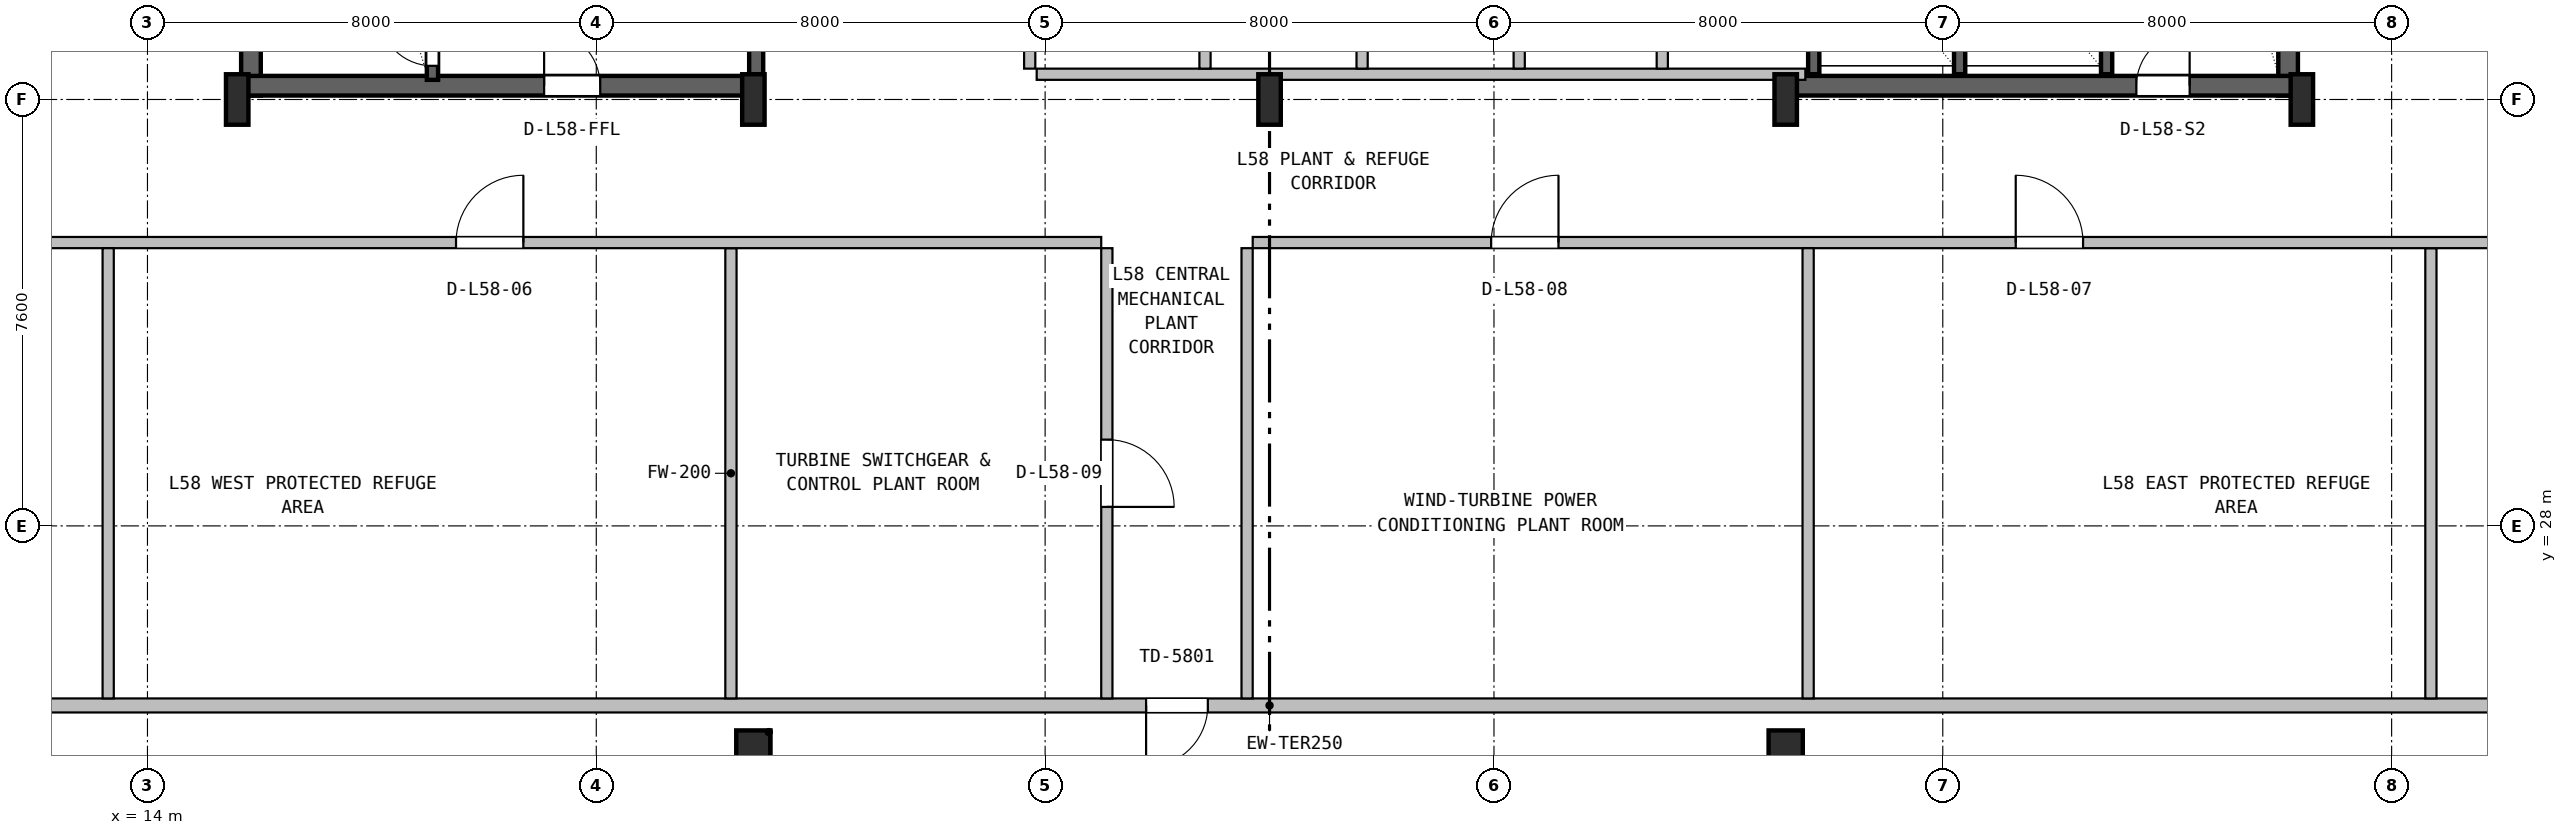
"""IFC4 building model, lengths in metres.
Left out: names, types, materials, properties, quantities, classifications, styles, units other than length and angle.
Written with IfcOpenShell. Run it as: python <this file> out.ifc"""

import sys

from ifc_helpers import new_model, si_unit, direction, frame, frame_2d, origin, origin_2d, place, context, subcontext, project, spatial, rectangle, hollow_circle, i_section, extrude, source, transform, mapped, element, fill, save


model = new_model("IFC4")
c1 = context("Model", 3, precision=1e-05, world=origin(), true_north=direction((0.0, 1.0)))
c2 = subcontext(c1, "Body", "Model", "MODEL_VIEW")
j1 = project(units=[si_unit("LENGTHUNIT", "METRE"), si_unit("PLANEANGLEUNIT", "RADIAN")], contexts=[c1])
p1 = place(None, origin())
s1 = spatial("IfcSite", under=j1, at=p1, CompositionType="ELEMENT")
p2 = place(p1, origin())
s2 = spatial("IfcBuilding", under=s1, at=p2, CompositionType="ELEMENT")
p3 = place(p2, frame((0.0, 0.0, 234.0)))
s3 = spatial("IfcBuildingStorey", under=s2, at=p3, CompositionType="ELEMENT", Elevation=234.0)
for number, where, z_axis, x_axis in (
    (1, (15.845, 35.67, 0.0), (0.0, 0.0, 1.0), (0.0, 1.0, 0.0)),
    (2, (52.155, 35.67, 0.0), (0.0, 0.0, 1.0), (0.0, 1.0, 0.0)),
):
    element("IfcWall", number, at=place(p3, frame(where, z_axis=z_axis, x_axis=x_axis)), inside=s3, PredefinedType="SHEAR", context=c2, shape_type="SweptSolid", body=[
        extrude(rectangle(XDim=11.13, YDim=0.35, at=frame_2d((5.565, 0.0))), origin(), (0.0, 0.0, 1.0), 5.15),
    ])
p4 = place(p3, frame((15.67, 35.845, 0.0), z_axis=(0.0, 0.0, 1.0), x_axis=(1.0, 0.0, 0.0)))
e3 = element("IfcWall", 3, at=p4, inside=s3, PredefinedType="SHEAR", context=c2, shape_type="SweptSolid", body=[
    extrude(rectangle(XDim=9.13, YDim=0.35, at=frame_2d((4.565, 0.0))), origin(), (0.0, 0.0, 1.0), 5.15),
])
p5 = place(p4, frame((5.4, 0.0, 0.0)))
e4 = element("IfcOpeningElement", 4, at=p5, cuts=e3, PredefinedType="OPENING", context=c2, shape_type="SweptSolid", body=[
    extrude(rectangle(XDim=1.0, YDim=2.1, at=frame_2d((0.5, 1.05))), frame((0.0, 0.185, 0.0), z_axis=(0.0, -1.0, 0.0), x_axis=(1.0, 0.0, 0.0)), (0.0, 0.0, 1.0), 0.37),
])
p6 = place(p3, frame((43.2, 35.845, 0.0), z_axis=(0.0, 0.0, 1.0), x_axis=(1.0, 0.0, 0.0)))
e5 = element("IfcWall", 5, at=p6, inside=s3, PredefinedType="SHEAR", context=c2, shape_type="SweptSolid", body=[
    extrude(rectangle(XDim=9.13, YDim=0.35, at=frame_2d((4.565, 0.0))), origin(), (0.0, 0.0, 1.0), 5.15),
])
p7 = place(p6, frame((6.25, 0.0, 0.0)))
e6 = element("IfcOpeningElement", 6, at=p7, cuts=e5, PredefinedType="OPENING", context=c2, shape_type="SweptSolid", body=[
    extrude(rectangle(XDim=0.95, YDim=2.1, at=frame_2d((0.475, 1.05))), frame((0.0, 0.185, 0.0), z_axis=(0.0, -1.0, 0.0), x_axis=(1.0, 0.0, 0.0)), (0.0, 0.0, 1.0), 0.37),
])
m1 = source(origin(), c2, "Body", "SweptSolid", [
    extrude(i_section(OverallWidth=0.4, OverallDepth=0.9, WebThickness=0.016, FlangeThickness=0.028, FilletRadius=0.016, at=origin_2d()), origin(), (0.0, 0.0, 1.0), 5.4),
])
for number, where, z_axis, x_axis in (
    (7, (15.6, 35.6, 0.0), (0.0, 0.0, 1.0), (1.0, 0.0, 0.0)),
    (8, (24.8, 35.6, 0.0), (0.0, 0.0, 1.0), (1.0, 0.0, 0.0)),
    (9, (34.0, 35.6, 0.0), (0.0, 0.0, 1.0), (1.0, 0.0, 0.0)),
    (10, (43.2, 35.6, 0.0), (0.0, 0.0, 1.0), (1.0, 0.0, 0.0)),
    (11, (52.4, 35.6, 0.0), (0.0, 0.0, 1.0), (1.0, 0.0, 0.0)),
):
    element("IfcColumn", number, at=place(p3, frame(where, z_axis=z_axis, x_axis=x_axis)), inside=s3, PredefinedType="COLUMN", context=c2, shape_type="MappedRepresentation", body=[
        mapped(m1, transform((0.0, 0.0, 0.0), x_axis=(1.0, 0.0, 0.0), y_axis=(0.0, 1.0, 0.0), z_axis=(0.0, 0.0, 1.0), scale=1.0)),
    ])
m2 = source(origin(), c2, "Body", "SweptSolid", [
    extrude(hollow_circle(Radius=0.305, WallThickness=0.025, at=origin_2d()), origin(), (0.0, 0.0, 1.0), 5.4),
])
for number, where, z_axis, x_axis in (
    (12, (24.8, 24.05, 0.0), (0.0, 0.0, 1.0), (1.0, 0.0, 0.0)),
    (13, (43.2, 24.05, 0.0), (0.0, 0.0, 1.0), (1.0, 0.0, 0.0)),
):
    element("IfcColumn", number, at=place(p3, frame(where, z_axis=z_axis, x_axis=x_axis)), inside=s3, PredefinedType="COLUMN", context=c2, shape_type="MappedRepresentation", body=[
        mapped(m2, transform((0.0, 0.0, 0.0), x_axis=(1.0, 0.0, 0.0), y_axis=(0.0, 1.0, 0.0), z_axis=(0.0, 0.0, 1.0), scale=1.0)),
    ])
p8 = place(p3, frame((9.58, 24.8, 0.0), z_axis=(0.0, 0.0, 1.0), x_axis=(1.0, 0.0, 0.0)))
e14 = element("IfcWall", 14, at=p8, inside=s3, PredefinedType="SOLIDWALL", context=c2, shape_type="SweptSolid", body=[
    extrude(rectangle(XDim=48.84, YDim=0.25, at=frame_2d((24.42, 0.0))), origin(), (0.0, 0.0, 1.0), 4.508),
])
p9 = place(p8, frame((22.22, 0.0, 0.0)))
e15 = element("IfcOpeningElement", 15, at=p9, cuts=e14, PredefinedType="OPENING", context=c2, shape_type="SweptSolid", body=[
    extrude(rectangle(XDim=1.1, YDim=2.15, at=frame_2d((0.55, 1.075))), frame((0.0, 0.135, 0.0), z_axis=(0.0, -1.0, 0.0), x_axis=(1.0, 0.0, 0.0)), (0.0, 0.0, 1.0), 0.27),
])
p10 = place(p3, frame((19.08, 35.95, 0.0), z_axis=(0.0, 0.0, 1.0), x_axis=(0.0, 1.0, 0.0)))
e16 = element("IfcWall", 16, at=p10, inside=s3, PredefinedType="SHEAR", context=c2, shape_type="SweptSolid", body=[
    extrude(rectangle(XDim=9.65, YDim=0.2, at=frame_2d((4.825, 0.0))), origin(), (0.0, 0.0, 1.0), 5.15),
])
p11 = place(p10, frame((0.25, 0.0, 0.0)))
e17 = element("IfcOpeningElement", 17, at=p11, cuts=e16, PredefinedType="OPENING", context=c2, shape_type="SweptSolid", body=[
    extrude(rectangle(XDim=0.95, YDim=2.1, at=frame_2d((0.475, 1.05))), frame((0.0, 0.11, 0.0), z_axis=(0.0, -1.0, 0.0), x_axis=(1.0, 0.0, 0.0)), (0.0, 0.0, 1.0), 0.22),
])
p12 = place(p3, frame((24.85, 36.05, 0.0), z_axis=(0.0, 0.0, 1.0), x_axis=(0.0, 1.0, 0.0)))
e18 = element("IfcWall", 18, at=p12, inside=s3, PredefinedType="SHEAR", context=c2, shape_type="SweptSolid", body=[
    extrude(rectangle(XDim=10.45, YDim=0.25, at=frame_2d((5.225, 0.0))), origin(), (0.0, 0.0, 1.0), 5.15),
])
p13 = place(p3, frame((48.92, 36.05, 0.0), z_axis=(0.0, 0.0, 1.0), x_axis=(0.0, 1.0, 0.0)))
e19 = element("IfcWall", 19, at=p13, inside=s3, PredefinedType="SHEAR", context=c2, shape_type="SweptSolid", body=[
    extrude(rectangle(XDim=10.5, YDim=0.2, at=frame_2d((5.25, 0.0))), origin(), (0.0, 0.0, 1.0), 5.15),
])
for number, where, z_axis, x_axis in (
    (20, (43.7, 36.05, 0.0), (0.0, 0.0, 1.0), (0.0, 1.0, 0.0)),
    (21, (46.3, 36.05, 0.0), (0.0, 0.0, 1.0), (0.0, 1.0, 0.0)),
):
    element("IfcWall", number, at=place(p3, frame(where, z_axis=z_axis, x_axis=x_axis)), inside=s3, PredefinedType="SHEAR", context=c2, shape_type="SweptSolid", body=[
        extrude(rectangle(XDim=3.05, YDim=0.2, at=frame_2d((1.525, 0.0))), origin(), (0.0, 0.0, 1.0), 5.15),
    ])
p14 = place(p3, frame((29.85, 36.05, 0.0), z_axis=(0.0, 0.0, 1.0), x_axis=(1.0, 0.0, 0.0)))
e22 = element("IfcWall", 22, at=p14, inside=s3, PredefinedType="SOLIDWALL", context=c2, shape_type="SweptSolid", body=[
    extrude(rectangle(XDim=13.7, YDim=0.2, at=frame_2d((6.85, 0.0))), origin(), (0.0, 0.0, 1.0), 5.13),
])
for number, where, z_axis, x_axis in (
    (23, (32.85, 36.15, 0.0), (0.0, 0.0, 1.0), (0.0, 1.0, 0.0)),
    (24, (29.725, 36.15, 0.0), (0.0, 0.0, 1.0), (0.0, 1.0, 0.0)),
    (25, (35.65, 36.15, 0.0), (0.0, 0.0, 1.0), (0.0, 1.0, 0.0)),
    (26, (38.45, 36.15, 0.0), (0.0, 0.0, 1.0), (0.0, 1.0, 0.0)),
    (27, (41.0, 36.15, 0.0), (0.0, 0.0, 1.0), (0.0, 1.0, 0.0)),
):
    element("IfcWall", number, at=place(p3, frame(where, z_axis=z_axis, x_axis=x_axis)), inside=s3, PredefinedType="SOLIDWALL", context=c2, shape_type="SweptSolid", body=[
        extrude(rectangle(XDim=3.0, YDim=0.2, at=frame_2d((1.5, 0.0))), origin(), (0.0, 0.0, 1.0), 5.13),
    ])
p15 = place(p3, frame((24.4, 24.925, 0.0), z_axis=(0.0, 0.0, 1.0), x_axis=(0.0, 1.0, 0.0)))
e28 = element("IfcWall", 28, at=p15, inside=s3, PredefinedType="SOLIDWALL", context=c2, shape_type="SweptSolid", body=[
    extrude(rectangle(XDim=8.025, YDim=0.2, at=frame_2d((4.012, 0.0))), origin(), (0.0, 0.0, 1.0), 4.822),
])
p16 = place(p3, frame((9.68, 33.05, 0.0), z_axis=(0.0, 0.0, 1.0), x_axis=(1.0, 0.0, 0.0)))
e29 = element("IfcWall", 29, at=p16, inside=s3, PredefinedType="SOLIDWALL", context=c2, shape_type="SweptSolid", body=[
    extrude(rectangle(XDim=21.32, YDim=0.2, at=frame_2d((10.66, 0.0))), origin(), (0.0, 0.0, 1.0), 4.508),
])
p17 = place(p16, frame((9.82, 0.0, 0.0)))
e30 = element("IfcOpeningElement", 30, at=p17, cuts=e29, PredefinedType="OPENING", context=c2, shape_type="SweptSolid", body=[
    extrude(rectangle(XDim=1.2, YDim=2.1, at=frame_2d((0.6, 1.05))), frame((0.0, 0.11, 0.0), z_axis=(0.0, -1.0, 0.0), x_axis=(1.0, 0.0, 0.0)), (0.0, 0.0, 1.0), 0.22),
])
for number, where, z_axis, x_axis in (
    (31, (13.3, 24.925, 0.0), (0.0, 0.0, 1.0), (0.0, 1.0, 0.0)),
    (32, (54.7, 24.925, 0.0), (0.0, 0.0, 1.0), (0.0, 1.0, 0.0)),
):
    element("IfcWall", number, at=place(p3, frame(where, z_axis=z_axis, x_axis=x_axis)), inside=s3, PredefinedType="SOLIDWALL", context=c2, shape_type="SweptSolid", body=[
        extrude(rectangle(XDim=8.025, YDim=0.2, at=frame_2d((4.012, 0.0))), origin(), (0.0, 0.0, 1.0), 4.822),
    ])
p18 = place(p3, frame((33.7, 33.05, 0.0), z_axis=(0.0, 0.0, 1.0), x_axis=(1.0, 0.0, 0.0)))
e33 = element("IfcWall", 33, at=p18, inside=s3, PredefinedType="SOLIDWALL", context=c2, shape_type="SweptSolid", body=[
    extrude(rectangle(XDim=24.62, YDim=0.2, at=frame_2d((12.31, 0.0))), origin(), (0.0, 0.0, 1.0), 4.508),
])
p19 = place(p18, frame((13.6, 0.0, 0.0)))
e34 = element("IfcOpeningElement", 34, at=p19, cuts=e33, PredefinedType="OPENING", context=c2, shape_type="SweptSolid", body=[
    extrude(rectangle(XDim=1.2, YDim=2.1, at=frame_2d((0.6, 1.05))), frame((0.0, 0.11, 0.0), z_axis=(0.0, -1.0, 0.0), x_axis=(1.0, 0.0, 0.0)), (0.0, 0.0, 1.0), 0.22),
])
p20 = place(p18, frame((4.25, 0.0, 0.0)))
e35 = element("IfcOpeningElement", 35, at=p20, cuts=e33, PredefinedType="OPENING", context=c2, shape_type="SweptSolid", body=[
    extrude(rectangle(XDim=1.2, YDim=2.1, at=frame_2d((0.6, 1.05))), frame((0.0, 0.11, 0.0), z_axis=(0.0, -1.0, 0.0), x_axis=(1.0, 0.0, 0.0)), (0.0, 0.0, 1.0), 0.22),
])
for number, where, z_axis, x_axis in (
    (36, (43.6, 24.925, 0.0), (0.0, 0.0, 1.0), (0.0, 1.0, 0.0)),
    (37, (33.6, 24.925, 0.0), (0.0, 0.0, 1.0), (0.0, 1.0, 0.0)),
):
    element("IfcWall", number, at=place(p3, frame(where, z_axis=z_axis, x_axis=x_axis)), inside=s3, PredefinedType="SOLIDWALL", context=c2, shape_type="SweptSolid", body=[
        extrude(rectangle(XDim=8.025, YDim=0.2, at=frame_2d((4.012, 0.0))), origin(), (0.0, 0.0, 1.0), 4.822),
    ])
p21 = place(p3, frame((31.1, 24.925, 0.0), z_axis=(0.0, 0.0, 1.0), x_axis=(0.0, 1.0, 0.0)))
e38 = element("IfcWall", 38, at=p21, inside=s3, PredefinedType="SOLIDWALL", context=c2, shape_type="SweptSolid", body=[
    extrude(rectangle(XDim=8.025, YDim=0.2, at=frame_2d((4.012, 0.0))), origin(), (0.0, 0.0, 1.0), 4.822),
])
p22 = place(p21, frame((3.413, 0.0, 0.0)))
e39 = element("IfcOpeningElement", 39, at=p22, cuts=e38, PredefinedType="OPENING", context=c2, shape_type="SweptSolid", body=[
    extrude(rectangle(XDim=1.2, YDim=2.1, at=frame_2d((0.6, 1.05))), frame((0.0, 0.11, 0.0), z_axis=(0.0, -1.0, 0.0), x_axis=(1.0, 0.0, 0.0)), (0.0, 0.0, 1.0), 0.22),
])
m3 = source(origin(), c2, "Body", "SweptSolid", [
    extrude(rectangle(XDim=1.1, YDim=2.15, at=frame_2d((0.55, 1.075))), frame((0.0, 0.025, 0.0), z_axis=(0.0, -1.0, 0.0), x_axis=(1.0, 0.0, 0.0)), (0.0, 0.0, 1.0), 0.05),
])
p23 = place(p9, frame((1.1, 0.0, 0.0), z_axis=(0.0, 0.0, 1.0), x_axis=(-1.0, 0.0, 0.0)))
e40 = element("IfcDoor", 40, at=p23, inside=s3, OperationType="SINGLE_SWING_LEFT", PredefinedType="DOOR", context=c2, shape_type="MappedRepresentation", body=[
    mapped(m3, transform((0.0, 0.0, 0.0), x_axis=(1.0, 0.0, 0.0), y_axis=(0.0, 1.0, 0.0), z_axis=(0.0, 0.0, 1.0), scale=1.0)),
])
fill(e15, e40)
m4 = source(origin(), c2, "Body", "SweptSolid", [
    extrude(rectangle(XDim=0.95, YDim=2.1, at=frame_2d((0.475, 1.05))), frame((0.0, 0.025, 0.0), z_axis=(0.0, -1.0, 0.0), x_axis=(1.0, 0.0, 0.0)), (0.0, 0.0, 1.0), 0.05),
])
p24 = place(p11, origin())
e41 = element("IfcDoor", 41, at=p24, inside=s3, OperationType="SINGLE_SWING_RIGHT", PredefinedType="DOOR", context=c2, shape_type="MappedRepresentation", body=[
    mapped(m4, transform((0.0, 0.0, 0.0), x_axis=(1.0, 0.0, 0.0), y_axis=(0.0, 1.0, 0.0), z_axis=(0.0, 0.0, 1.0), scale=1.0)),
])
fill(e17, e41)
m5 = source(origin(), c2, "Body", "SweptSolid", [
    extrude(rectangle(XDim=1.0, YDim=2.1, at=frame_2d((0.5, 1.05))), frame((0.0, 0.025, 0.0), z_axis=(0.0, -1.0, 0.0), x_axis=(1.0, 0.0, 0.0)), (0.0, 0.0, 1.0), 0.05),
])
p25 = place(p5, origin())
e42 = element("IfcDoor", 42, at=p25, inside=s3, OperationType="SINGLE_SWING_LEFT", PredefinedType="DOOR", context=c2, shape_type="MappedRepresentation", body=[
    mapped(m5, transform((0.0, 0.0, 0.0), x_axis=(1.0, 0.0, 0.0), y_axis=(0.0, 1.0, 0.0), z_axis=(0.0, 0.0, 1.0), scale=1.0)),
])
fill(e4, e42)
p26 = place(p7, origin())
e43 = element("IfcDoor", 43, at=p26, inside=s3, OperationType="SINGLE_SWING_RIGHT", PredefinedType="DOOR", context=c2, shape_type="MappedRepresentation", body=[
    mapped(m4, transform((0.0, 0.0, 0.0), x_axis=(1.0, 0.0, 0.0), y_axis=(0.0, 1.0, 0.0), z_axis=(0.0, 0.0, 1.0), scale=1.0)),
])
fill(e6, e43)
m6 = source(origin(), c2, "Body", "SweptSolid", [
    extrude(rectangle(XDim=1.2, YDim=2.1, at=frame_2d((0.6, 1.05))), frame((0.0, 0.025, 0.0), z_axis=(0.0, -1.0, 0.0), x_axis=(1.0, 0.0, 0.0)), (0.0, 0.0, 1.0), 0.05),
])
p27 = place(p17, origin())
e44 = element("IfcDoor", 44, at=p27, inside=s3, OperationType="SINGLE_SWING_RIGHT", PredefinedType="DOOR", context=c2, shape_type="MappedRepresentation", body=[
    mapped(m6, transform((0.0, 0.0, 0.0), x_axis=(1.0, 0.0, 0.0), y_axis=(0.0, 1.0, 0.0), z_axis=(0.0, 0.0, 1.0), scale=1.0)),
])
fill(e30, e44)
p28 = place(p19, origin())
e45 = element("IfcDoor", 45, at=p28, inside=s3, OperationType="SINGLE_SWING_LEFT", PredefinedType="DOOR", context=c2, shape_type="MappedRepresentation", body=[
    mapped(m6, transform((0.0, 0.0, 0.0), x_axis=(1.0, 0.0, 0.0), y_axis=(0.0, 1.0, 0.0), z_axis=(0.0, 0.0, 1.0), scale=1.0)),
])
fill(e34, e45)
p29 = place(p20, origin())
e46 = element("IfcDoor", 46, at=p29, inside=s3, OperationType="SINGLE_SWING_RIGHT", PredefinedType="DOOR", context=c2, shape_type="MappedRepresentation", body=[
    mapped(m6, transform((0.0, 0.0, 0.0), x_axis=(1.0, 0.0, 0.0), y_axis=(0.0, 1.0, 0.0), z_axis=(0.0, 0.0, 1.0), scale=1.0)),
])
fill(e35, e46)
p30 = place(p22, frame((1.2, 0.0, 0.0), z_axis=(0.0, 0.0, 1.0), x_axis=(-1.0, 0.0, 0.0)))
e47 = element("IfcDoor", 47, at=p30, inside=s3, OperationType="SINGLE_SWING_LEFT", PredefinedType="DOOR", context=c2, shape_type="MappedRepresentation", body=[
    mapped(m6, transform((0.0, 0.0, 0.0), x_axis=(1.0, 0.0, 0.0), y_axis=(0.0, 1.0, 0.0), z_axis=(0.0, 0.0, 1.0), scale=1.0)),
])
fill(e39, e47)
save(model, sys.argv[1])
